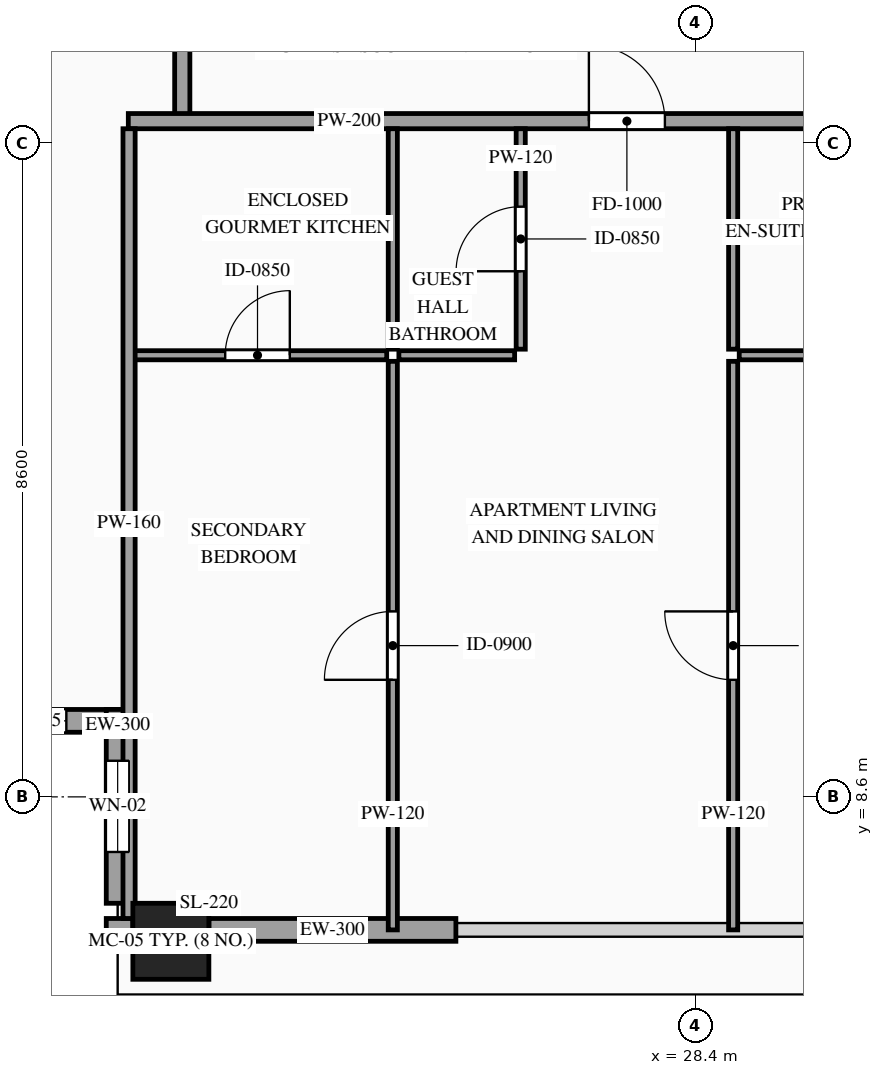
"""IFC4 building model, lengths in metres.
Left out: names, types, materials, properties, quantities, classifications, styles, units other than length and angle.
Written with IfcOpenShell. Run it as: python <this file> out.ifc"""

import sys

from ifc_helpers import new_model, si_unit, direction, frame, frame_2d, origin, origin_2d, place, context, subcontext, project, spatial, rectangle, hollow_rectangle, extrude, source, transform, mapped, element, fill, save


model = new_model("IFC4")
c1 = context("Model", 3, precision=1e-05, world=origin(), true_north=direction((0.0, 1.0)))
c2 = subcontext(c1, "Body", "Model", "MODEL_VIEW")
j1 = project(units=[si_unit("LENGTHUNIT", "METRE"), si_unit("PLANEANGLEUNIT", "RADIAN")], contexts=[c1])
p1 = place(None, origin())
s1 = spatial("IfcSite", under=j1, at=p1, CompositionType="ELEMENT")
p2 = place(p1, origin())
s2 = spatial("IfcBuilding", under=s1, at=p2, CompositionType="ELEMENT")
p3 = place(p2, frame((0.0, 0.0, 332.2)))
s3 = spatial("IfcBuildingStorey", under=s2, at=p3, CompositionType="ELEMENT", Elevation=332.2)
m1 = source(origin(), c2, "Body", "SweptSolid", [
    extrude(hollow_rectangle(XDim=1.0, YDim=1.0, WallThickness=0.048, at=origin_2d()), origin(), (0.0, 0.0, 1.0), 3.5),
])
p4 = place(p3, frame((21.5, 6.7, 0.0), z_axis=(0.0, 0.0, 1.0), x_axis=(1.0, 0.0, 0.0)))
e1 = element("IfcColumn", 1, at=p4, inside=s3, PredefinedType="COLUMN", context=c2, shape_type="MappedRepresentation", body=[
    mapped(m1, transform((0.0, 0.0, 0.0), scale=1.0)),
])
p5 = place(p3, frame((18.4, 9.6, 0.0), z_axis=(0.0, 0.0, 1.0), x_axis=(1.0, 0.0, 0.0)))
e2 = element("IfcWall", 2, at=p5, inside=s3, PredefinedType="SOLIDWALL", context=c2, shape_type="SweptSolid", body=[
    extrude(rectangle(XDim=2.55, YDim=0.3, at=frame_2d((1.275, 0.0))), origin(), (0.0, 0.0, 1.0), 3.28),
])
p6 = place(p5, frame((0.825, 0.0, 0.85)))
e3 = element("IfcOpeningElement", 3, at=p6, cuts=e2, PredefinedType="OPENING", context=c2, shape_type="SweptSolid", body=[
    extrude(rectangle(XDim=0.9, YDim=1.5, at=frame_2d((0.45, 0.75))), frame((0.0, 0.165, 0.0), z_axis=(0.0, -1.0, 0.0), x_axis=(1.0, 0.0, 0.0)), (0.0, 0.0, 1.0), 0.33),
])
p7 = place(p3, frame((20.8, 9.75, 0.0), z_axis=(0.0, 0.0, 1.0), x_axis=(0.0, -1.0, 0.0)))
e4 = element("IfcWall", 4, at=p7, inside=s3, PredefinedType="SOLIDWALL", context=c2, shape_type="SweptSolid", body=[
    extrude(rectangle(XDim=2.55, YDim=0.3, at=frame_2d((1.275, 0.0))), origin(), (0.0, 0.0, 1.0), 3.28),
])
p8 = place(p7, frame((0.675, 0.0, 0.85)))
e5 = element("IfcOpeningElement", 5, at=p8, cuts=e4, PredefinedType="OPENING", context=c2, shape_type="SweptSolid", body=[
    extrude(rectangle(XDim=1.2, YDim=2.1, at=frame_2d((0.6, 1.05))), frame((0.0, 0.165, 0.0), z_axis=(0.0, -1.0, 0.0), x_axis=(1.0, 0.0, 0.0)), (0.0, 0.0, 1.0), 0.33),
])
m2 = source(origin(), c2, "Body", "SweptSolid", [
    extrude(rectangle(XDim=0.35, YDim=0.3, at=frame_2d((0.175, 0.0))), origin(), (0.0, 0.0, 1.0), 3.28),
])
p9 = place(p3, frame((20.65, 6.85, 0.0), z_axis=(0.0, 0.0, 1.0), x_axis=(1.0, 0.0, 0.0)))
e6 = element("IfcWall", 6, at=p9, inside=s3, PredefinedType="SOLIDWALL", context=c2, shape_type="MappedRepresentation", body=[
    mapped(m2, transform((0.0, 0.0, 0.0), scale=1.0)),
])
m3 = source(origin(), c2, "Body", "SweptSolid", [
    extrude(rectangle(XDim=3.25, YDim=0.3, at=frame_2d((1.625, 0.0))), origin(), (0.0, 0.0, 1.0), 2.885),
])
p10 = place(p3, frame((22.0, 6.85, 0.0), z_axis=(0.0, 0.0, 1.0), x_axis=(1.0, 0.0, 0.0)))
e7 = element("IfcWall", 7, at=p10, inside=s3, PredefinedType="SOLIDWALL", context=c2, shape_type="MappedRepresentation", body=[
    mapped(m3, transform((0.0, 0.0, 0.0), scale=1.0)),
])
m4 = source(origin(), c2, "Body", "SweptSolid", [
    extrude(rectangle(XDim=1.7, YDim=0.2, at=frame_2d((0.85, 0.0))), origin(), (0.0, 0.0, 1.0), 3.28),
])
p11 = place(p3, frame((21.65, 17.55, 0.0), z_axis=(0.0, 0.0, 1.0), x_axis=(0.0, 1.0, 0.0)))
e8 = element("IfcWall", 8, at=p11, inside=s3, PredefinedType="PARTITIONING", context=c2, shape_type="MappedRepresentation", body=[
    mapped(m4, transform((0.0, 0.0, 0.0), scale=1.0)),
])
p12 = place(p3, frame((20.94, 17.49, 0.0), z_axis=(0.0, 0.0, 1.0), x_axis=(1.0, 0.0, 0.0)))
e9 = element("IfcWall", 9, at=p12, inside=s3, PredefinedType="PARTITIONING", context=c2, shape_type="SweptSolid", body=[
    extrude(rectangle(XDim=11.483, YDim=0.2, at=frame_2d((5.742, 0.0))), origin(), (0.0, 0.0, 1.0), 3.28),
])
p13 = place(p12, frame((6.06, 0.0, 0.0)))
e10 = element("IfcOpeningElement", 10, at=p13, cuts=e9, PredefinedType="OPENING", context=c2, shape_type="SweptSolid", body=[
    extrude(rectangle(XDim=1.0, YDim=2.2, at=frame_2d((0.5, 1.1))), frame((0.0, 0.115, 0.0), z_axis=(0.0, -1.0, 0.0), x_axis=(1.0, 0.0, 0.0)), (0.0, 0.0, 1.0), 0.23),
])
p14 = place(p3, frame((20.94, 14.41, 0.0), z_axis=(0.0, 0.0, 1.0), x_axis=(1.0, 0.0, 0.0)))
e11 = element("IfcWall", 11, at=p14, inside=s3, PredefinedType="PARTITIONING", context=c2, shape_type="SweptSolid", body=[
    extrude(rectangle(XDim=3.4, YDim=0.12, at=frame_2d((1.7, 0.0))), origin(), (0.0, 0.0, 1.0), 3.28),
])
p15 = place(p14, frame((1.275, 0.0, 0.0)))
e12 = element("IfcOpeningElement", 12, at=p15, cuts=e11, PredefinedType="OPENING", context=c2, shape_type="SweptSolid", body=[
    extrude(rectangle(XDim=0.85, YDim=2.1, at=frame_2d((0.425, 1.05))), frame((0.0, 0.075, 0.0), z_axis=(0.0, -1.0, 0.0), x_axis=(1.0, 0.0, 0.0)), (0.0, 0.0, 1.0), 0.15),
])
m5 = source(origin(), c2, "Body", "SweptSolid", [
    extrude(rectangle(XDim=2.9, YDim=0.12, at=frame_2d((1.45, 0.0))), origin(), (0.0, 0.0, 1.0), 3.28),
])
p16 = place(p3, frame((24.42, 14.49, 0.0), z_axis=(0.0, 0.0, 1.0), x_axis=(0.0, 1.0, 0.0)))
e13 = element("IfcWall", 13, at=p16, inside=s3, PredefinedType="PARTITIONING", context=c2, shape_type="MappedRepresentation", body=[
    mapped(m5, transform((0.0, 0.0, 0.0), scale=1.0)),
])
m6 = source(origin(), c2, "Body", "SweptSolid", [
    extrude(rectangle(XDim=1.523, YDim=0.12, at=frame_2d((0.761, 0.0))), origin(), (0.0, 0.0, 1.0), 3.28),
])
p17 = place(p3, frame((24.5, 14.41, 0.0), z_axis=(0.0, 0.0, 1.0), x_axis=(1.0, 0.0, 0.0)))
e14 = element("IfcWall", 14, at=p17, inside=s3, PredefinedType="PARTITIONING", context=c2, shape_type="MappedRepresentation", body=[
    mapped(m6, transform((0.0, 0.0, 0.0), scale=1.0)),
])
p18 = place(p3, frame((26.103, 14.49, 0.0), z_axis=(0.0, 0.0, 1.0), x_axis=(0.0, 1.0, 0.0)))
e15 = element("IfcWall", 15, at=p18, inside=s3, PredefinedType="PARTITIONING", context=c2, shape_type="SweptSolid", body=[
    extrude(rectangle(XDim=2.9, YDim=0.12, at=frame_2d((1.45, 0.0))), origin(), (0.0, 0.0, 1.0), 3.28),
])
p19 = place(p18, frame((1.025, 0.0, 0.0)))
e16 = element("IfcOpeningElement", 16, at=p19, cuts=e15, PredefinedType="OPENING", context=c2, shape_type="SweptSolid", body=[
    extrude(rectangle(XDim=0.85, YDim=2.1, at=frame_2d((0.425, 1.05))), frame((0.0, 0.075, 0.0), z_axis=(0.0, -1.0, 0.0), x_axis=(1.0, 0.0, 0.0)), (0.0, 0.0, 1.0), 0.15),
])
p20 = place(p3, frame((28.978, 14.41, 0.0), z_axis=(0.0, 0.0, 1.0), x_axis=(1.0, 0.0, 0.0)))
e17 = element("IfcWall", 17, at=p20, inside=s3, PredefinedType="PARTITIONING", context=c2, shape_type="SweptSolid", body=[
    extrude(rectangle(XDim=3.445, YDim=0.12, at=frame_2d((1.723, 0.0))), origin(), (0.0, 0.0, 1.0), 3.28),
])
p21 = place(p20, frame((1.298, 0.0, 0.0)))
e18 = element("IfcOpeningElement", 18, at=p21, cuts=e17, PredefinedType="OPENING", context=c2, shape_type="SweptSolid", body=[
    extrude(rectangle(XDim=0.85, YDim=2.1, at=frame_2d((0.425, 1.05))), frame((0.0, 0.075, 0.0), z_axis=(0.0, -1.0, 0.0), x_axis=(1.0, 0.0, 0.0)), (0.0, 0.0, 1.0), 0.15),
])
p22 = place(p3, frame((28.898, 14.49, 0.0), z_axis=(0.0, 0.0, 1.0), x_axis=(0.0, 1.0, 0.0)))
e19 = element("IfcWall", 19, at=p22, inside=s3, PredefinedType="PARTITIONING", context=c2, shape_type="MappedRepresentation", body=[
    mapped(m5, transform((0.0, 0.0, 0.0), scale=1.0)),
])
p23 = place(p3, frame((24.42, 6.85, 0.0), z_axis=(0.0, 0.0, 1.0), x_axis=(0.0, 1.0, 0.0)))
e20 = element("IfcWall", 20, at=p23, inside=s3, PredefinedType="PARTITIONING", context=c2, shape_type="SweptSolid", body=[
    extrude(rectangle(XDim=7.48, YDim=0.12, at=frame_2d((3.74, 0.0))), origin(), (0.0, 0.0, 1.0), 3.28),
])
p24 = place(p23, frame((3.29, 0.0, 0.0)))
e21 = element("IfcOpeningElement", 21, at=p24, cuts=e20, PredefinedType="OPENING", context=c2, shape_type="SweptSolid", body=[
    extrude(rectangle(XDim=0.9, YDim=2.15, at=frame_2d((0.45, 1.075))), frame((0.0, 0.075, 0.0), z_axis=(0.0, -1.0, 0.0), x_axis=(1.0, 0.0, 0.0)), (0.0, 0.0, 1.0), 0.15),
])
p25 = place(p3, frame((28.898, 6.85, 0.0), z_axis=(0.0, 0.0, 1.0), x_axis=(0.0, 1.0, 0.0)))
e22 = element("IfcWall", 22, at=p25, inside=s3, PredefinedType="PARTITIONING", context=c2, shape_type="SweptSolid", body=[
    extrude(rectangle(XDim=7.48, YDim=0.12, at=frame_2d((3.74, 0.0))), origin(), (0.0, 0.0, 1.0), 3.28),
])
p26 = place(p25, frame((3.29, 0.0, 0.0)))
e23 = element("IfcOpeningElement", 23, at=p26, cuts=e22, PredefinedType="OPENING", context=c2, shape_type="SweptSolid", body=[
    extrude(rectangle(XDim=0.9, YDim=2.15, at=frame_2d((0.45, 1.075))), frame((0.0, 0.075, 0.0), z_axis=(0.0, -1.0, 0.0), x_axis=(1.0, 0.0, 0.0)), (0.0, 0.0, 1.0), 0.15),
])
m7 = source(origin(), c2, "Body", "SweptSolid", [
    extrude(rectangle(XDim=10.39, YDim=0.16, at=frame_2d((5.195, 0.0))), origin(), (0.0, 0.0, 1.0), 3.28),
])
p27 = place(p3, frame((20.95, 7.0, 0.0), z_axis=(0.0, 0.0, 1.0), x_axis=(0.0, 1.0, 0.0)))
e24 = element("IfcWall", 24, at=p27, inside=s3, PredefinedType="PARTITIONING", context=c2, shape_type="MappedRepresentation", body=[
    mapped(m7, transform((0.0, 0.0, 0.0), scale=1.0)),
])
m8 = source(origin(), c2, "Body", "SweptSolid", [
    extrude(rectangle(XDim=0.9, YDim=1.5, at=frame_2d((0.45, 0.75))), frame((0.0, 0.03, 0.0), z_axis=(0.0, -1.0, 0.0), x_axis=(1.0, 0.0, 0.0)), (0.0, 0.0, 1.0), 0.06),
])
p28 = place(p6, origin())
e25 = element("IfcWindow", 25, at=p28, inside=s3, PartitioningType="SINGLE_PANEL", PredefinedType="WINDOW", context=c2, shape_type="MappedRepresentation", body=[
    mapped(m8, transform((0.0, 0.0, 0.0), scale=1.0)),
])
fill(e3, e25)
m9 = source(origin(), c2, "Body", "SweptSolid", [
    extrude(rectangle(XDim=1.2, YDim=2.1, at=frame_2d((0.6, 1.05))), frame((0.0, 0.03, 0.0), z_axis=(0.0, -1.0, 0.0), x_axis=(1.0, 0.0, 0.0)), (0.0, 0.0, 1.0), 0.06),
])
p29 = place(p8, origin())
e26 = element("IfcWindow", 26, at=p29, inside=s3, PartitioningType="SINGLE_PANEL", PredefinedType="WINDOW", context=c2, shape_type="MappedRepresentation", body=[
    mapped(m9, transform((0.0, 0.0, 0.0), scale=1.0)),
])
fill(e5, e26)
m10 = source(origin(), c2, "Body", "SweptSolid", [
    extrude(rectangle(XDim=1.0, YDim=2.2, at=frame_2d((0.5, 1.1))), frame((0.0, 0.025, 0.0), z_axis=(0.0, -1.0, 0.0), x_axis=(1.0, 0.0, 0.0)), (0.0, 0.0, 1.0), 0.05),
])
p30 = place(p13, origin())
e27 = element("IfcDoor", 27, at=p30, inside=s3, OperationType="SINGLE_SWING_LEFT", PredefinedType="DOOR", context=c2, shape_type="MappedRepresentation", body=[
    mapped(m10, transform((0.0, 0.0, 0.0), scale=1.0)),
])
fill(e10, e27)
m11 = source(origin(), c2, "Body", "SweptSolid", [
    extrude(rectangle(XDim=0.85, YDim=2.1, at=frame_2d((0.425, 1.05))), frame((0.0, 0.025, 0.0), z_axis=(0.0, -1.0, 0.0), x_axis=(1.0, 0.0, 0.0)), (0.0, 0.0, 1.0), 0.05),
])
p31 = place(p15, origin())
e28 = element("IfcDoor", 28, at=p31, inside=s3, OperationType="SINGLE_SWING_RIGHT", PredefinedType="DOOR", context=c2, shape_type="MappedRepresentation", body=[
    mapped(m11, transform((0.0, 0.0, 0.0), scale=1.0)),
])
fill(e12, e28)
p32 = place(p19, origin())
e29 = element("IfcDoor", 29, at=p32, inside=s3, OperationType="SINGLE_SWING_LEFT", PredefinedType="DOOR", context=c2, shape_type="MappedRepresentation", body=[
    mapped(m11, transform((0.0, 0.0, 0.0), scale=1.0)),
])
fill(e16, e29)
m12 = source(origin(), c2, "Body", "SweptSolid", [
    extrude(rectangle(XDim=0.9, YDim=2.15, at=frame_2d((0.45, 1.075))), frame((0.0, 0.025, 0.0), z_axis=(0.0, -1.0, 0.0), x_axis=(1.0, 0.0, 0.0)), (0.0, 0.0, 1.0), 0.05),
])
p33 = place(p24, origin())
e30 = element("IfcDoor", 30, at=p33, inside=s3, OperationType="SINGLE_SWING_LEFT", PredefinedType="DOOR", context=c2, shape_type="MappedRepresentation", body=[
    mapped(m12, transform((0.0, 0.0, 0.0), scale=1.0)),
])
fill(e21, e30)
p34 = place(p26, origin())
e31 = element("IfcDoor", 31, at=p34, inside=s3, OperationType="SINGLE_SWING_RIGHT", PredefinedType="DOOR", context=c2, shape_type="MappedRepresentation", body=[
    mapped(m12, transform((0.0, 0.0, 0.0), scale=1.0)),
])
fill(e23, e31)
save(model, sys.argv[1])
